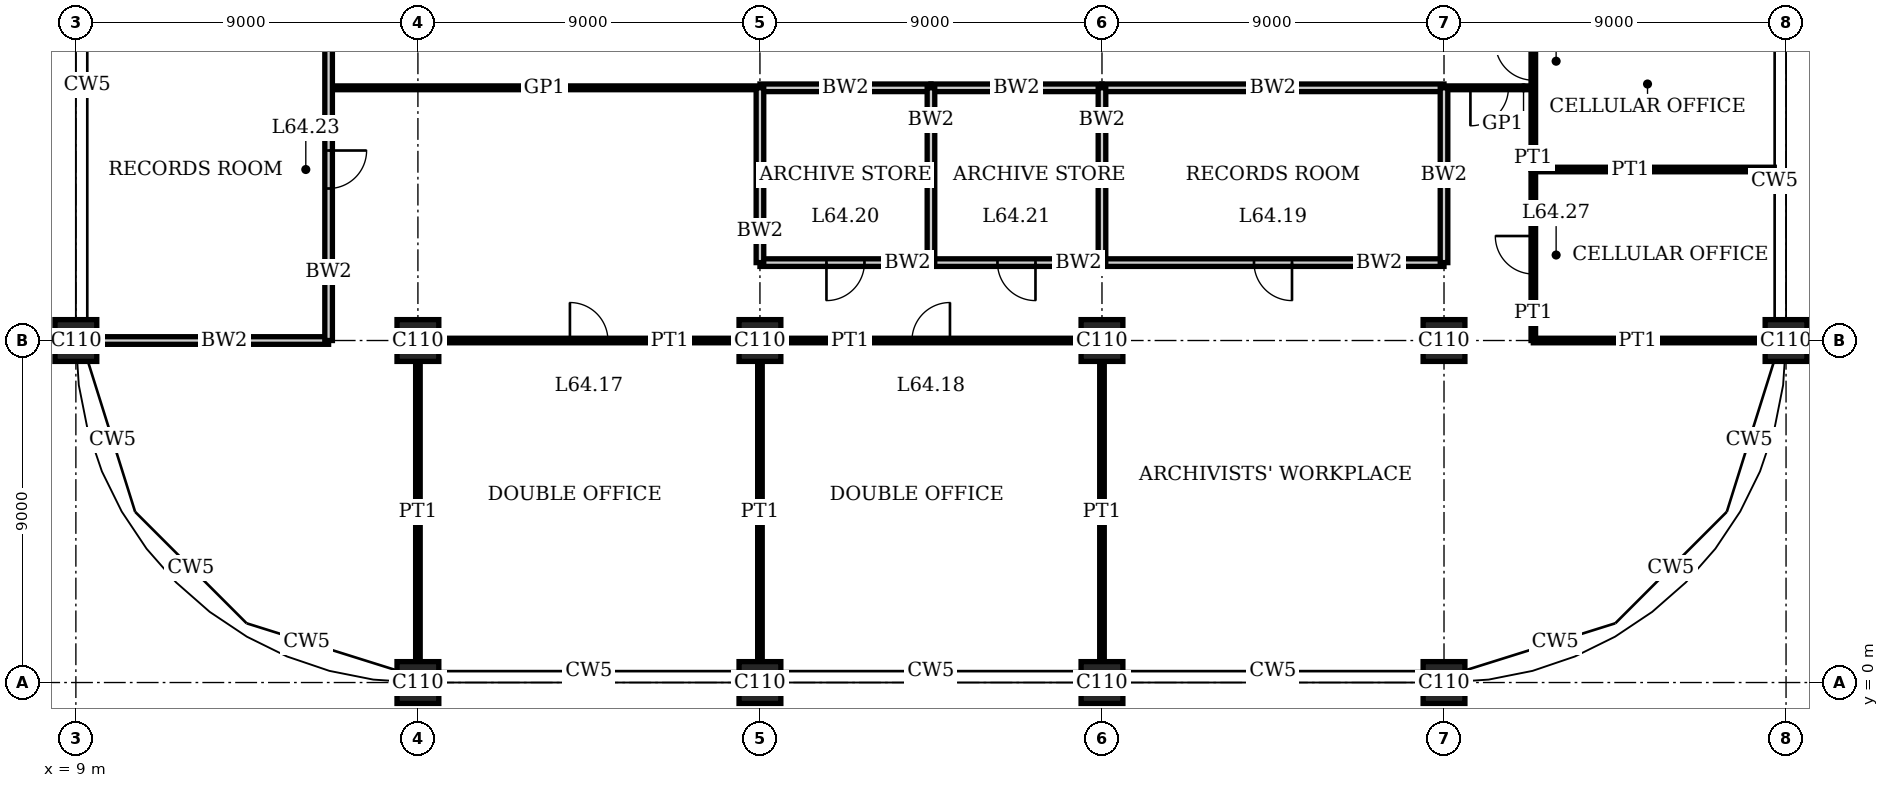
"""IFC4 building model, lengths in metres.
Left out: names, types, materials, properties, quantities, classifications, styles, units other than length and angle.
Written with IfcOpenShell. Run it as: python <this file> out.ifc"""

import sys

from ifc_helpers import new_model, si_unit, direction, frame, frame_2d, origin, origin_2d, place, context, subcontext, project, spatial, rectangle, extrude, element, fill, save


model = new_model("IFC4")
c1 = context("Model", 3, precision=1e-05, world=origin(), true_north=direction((0.0, 1.0)))
c2 = subcontext(c1, "Body", "Model", "MODEL_VIEW")
j1 = project(units=[si_unit("LENGTHUNIT", "METRE"), si_unit("PLANEANGLEUNIT", "RADIAN")], contexts=[c1])
p1 = place(None, origin())
s1 = spatial("IfcSite", under=j1, at=p1, CompositionType="ELEMENT")
p2 = place(p1, origin())
s2 = spatial("IfcBuilding", under=s1, at=p2, CompositionType="ELEMENT")
p3 = place(p2, frame((0.0, 0.0, 263.4)))
s3 = spatial("IfcBuildingStorey", under=s2, at=p3, CompositionType="ELEMENT", Elevation=263.4)
for number, where, z_axis, x_axis in (
    (1, (9.0, 9.0, 0.0), (0.0, 0.0, 1.0), (1.0, 0.0, 0.0)),
    (2, (18.0, 0.0, 0.0), (0.0, 0.0, 1.0), (1.0, 0.0, 0.0)),
    (3, (18.0, 9.0, 0.0), (0.0, 0.0, 1.0), (1.0, 0.0, 0.0)),
    (4, (27.0, 0.0, 0.0), (0.0, 0.0, 1.0), (1.0, 0.0, 0.0)),
    (5, (27.0, 9.0, 0.0), (0.0, 0.0, 1.0), (1.0, 0.0, 0.0)),
    (6, (36.0, 0.0, 0.0), (0.0, 0.0, 1.0), (1.0, 0.0, 0.0)),
    (7, (36.0, 9.0, 0.0), (0.0, 0.0, 1.0), (1.0, 0.0, 0.0)),
    (8, (45.0, 0.0, 0.0), (0.0, 0.0, 1.0), (1.0, 0.0, 0.0)),
    (9, (45.0, 9.0, 0.0), (0.0, 0.0, 1.0), (1.0, 0.0, 0.0)),
    (10, (54.0, 9.0, 0.0), (0.0, 0.0, 1.0), (1.0, 0.0, 0.0)),
):
    element("IfcColumn", number, at=place(p3, frame(where, z_axis=z_axis, x_axis=x_axis)), inside=s3, PredefinedType="COLUMN", context=c2, shape_type="SweptSolid", body=[
        extrude(rectangle(XDim=1.1, YDim=1.1, at=origin_2d()), origin(), (0.0, 0.0, 1.0), 4.0),
    ])
p4 = place(p3, frame((9.55, 9.0, 0.0), z_axis=(0.0, 0.0, 1.0), x_axis=(1.0, 0.0, 0.0)))
e11 = element("IfcWall", 11, at=p4, inside=s3, PredefinedType="SOLIDWALL", context=c2, shape_type="SweptSolid", body=[
    extrude(rectangle(XDim=6.1, YDim=0.2, at=frame_2d((3.05, 0.0))), origin(), (0.0, 0.0, 1.0), 3.05),
])
p5 = place(p3, frame((18.55, 9.0, 0.0), z_axis=(0.0, 0.0, 1.0), x_axis=(1.0, 0.0, 0.0)))
e12 = element("IfcWall", 12, at=p5, inside=s3, PredefinedType="PARTITIONING", context=c2, shape_type="SweptSolid", body=[
    extrude(rectangle(XDim=7.9, YDim=0.12, at=frame_2d((3.95, 0.0))), origin(), (0.0, 0.0, 1.0), 3.05),
])
p6 = place(p5, frame((3.45, 0.0, 0.0)))
e13 = element("IfcOpeningElement", 13, at=p6, cuts=e12, PredefinedType="OPENING", context=c2, shape_type="SweptSolid", body=[
    extrude(rectangle(XDim=1.0, YDim=2.4, at=frame_2d((0.5, 1.2))), frame((0.0, 0.07, 0.0), z_axis=(0.0, -1.0, 0.0), x_axis=(1.0, 0.0, 0.0)), (0.0, 0.0, 1.0), 0.14),
])
p7 = place(p3, frame((27.55, 9.0, 0.0), z_axis=(0.0, 0.0, 1.0), x_axis=(1.0, 0.0, 0.0)))
e14 = element("IfcWall", 14, at=p7, inside=s3, PredefinedType="PARTITIONING", context=c2, shape_type="SweptSolid", body=[
    extrude(rectangle(XDim=7.9, YDim=0.12, at=frame_2d((3.95, 0.0))), origin(), (0.0, 0.0, 1.0), 3.05),
])
p8 = place(p7, frame((3.45, 0.0, 0.0)))
e15 = element("IfcOpeningElement", 15, at=p8, cuts=e14, PredefinedType="OPENING", context=c2, shape_type="SweptSolid", body=[
    extrude(rectangle(XDim=1.0, YDim=2.4, at=frame_2d((0.5, 1.2))), frame((0.0, 0.07, 0.0), z_axis=(0.0, -1.0, 0.0), x_axis=(1.0, 0.0, 0.0)), (0.0, 0.0, 1.0), 0.14),
])
p9 = place(p3, frame((47.35, 9.0, 0.0), z_axis=(0.0, 0.0, 1.0), x_axis=(1.0, 0.0, 0.0)))
e16 = element("IfcWall", 16, at=p9, inside=s3, PredefinedType="PARTITIONING", context=c2, shape_type="SweptSolid", body=[
    extrude(rectangle(XDim=6.1, YDim=0.12, at=frame_2d((3.05, 0.0))), origin(), (0.0, 0.0, 1.0), 3.05),
])
p10 = place(p3, frame((36.0, 11.05, 0.0), z_axis=(0.0, 0.0, 1.0), x_axis=(1.0, 0.0, 0.0)))
e17 = element("IfcWall", 17, at=p10, inside=s3, PredefinedType="SOLIDWALL", context=c2, shape_type="SweptSolid", body=[
    extrude(rectangle(XDim=9.0, YDim=0.2, at=frame_2d((4.5, 0.0))), origin(), (0.0, 0.0, 1.0), 3.75),
])
p11 = place(p10, frame((4.0, 0.0, 0.0)))
e18 = element("IfcOpeningElement", 18, at=p11, cuts=e17, PredefinedType="OPENING", context=c2, shape_type="SweptSolid", body=[
    extrude(rectangle(XDim=1.0, YDim=2.4, at=frame_2d((0.5, 1.2))), frame((0.0, 0.11, 0.0), z_axis=(0.0, -1.0, 0.0), x_axis=(1.0, 0.0, 0.0)), (0.0, 0.0, 1.0), 0.22),
])
p12 = place(p3, frame((27.0, 11.05, 0.0), z_axis=(0.0, 0.0, 1.0), x_axis=(1.0, 0.0, 0.0)))
e19 = element("IfcWall", 19, at=p12, inside=s3, PredefinedType="SOLIDWALL", context=c2, shape_type="SweptSolid", body=[
    extrude(rectangle(XDim=4.5, YDim=0.2, at=frame_2d((2.25, 0.0))), origin(), (0.0, 0.0, 1.0), 3.75),
])
p13 = place(p12, frame((1.75, 0.0, 0.0)))
e20 = element("IfcOpeningElement", 20, at=p13, cuts=e19, PredefinedType="OPENING", context=c2, shape_type="SweptSolid", body=[
    extrude(rectangle(XDim=1.0, YDim=2.4, at=frame_2d((0.5, 1.2))), frame((0.0, 0.11, 0.0), z_axis=(0.0, -1.0, 0.0), x_axis=(1.0, 0.0, 0.0)), (0.0, 0.0, 1.0), 0.22),
])
p14 = place(p3, frame((31.5, 11.05, 0.0), z_axis=(0.0, 0.0, 1.0), x_axis=(1.0, 0.0, 0.0)))
e21 = element("IfcWall", 21, at=p14, inside=s3, PredefinedType="SOLIDWALL", context=c2, shape_type="SweptSolid", body=[
    extrude(rectangle(XDim=4.5, YDim=0.2, at=frame_2d((2.25, 0.0))), origin(), (0.0, 0.0, 1.0), 3.75),
])
p15 = place(p14, frame((1.75, 0.0, 0.0)))
e22 = element("IfcOpeningElement", 22, at=p15, cuts=e21, PredefinedType="OPENING", context=c2, shape_type="SweptSolid", body=[
    extrude(rectangle(XDim=1.0, YDim=2.4, at=frame_2d((0.5, 1.2))), frame((0.0, 0.11, 0.0), z_axis=(0.0, -1.0, 0.0), x_axis=(1.0, 0.0, 0.0)), (0.0, 0.0, 1.0), 0.22),
])
p16 = place(p3, frame((47.35, 13.5, 0.0), z_axis=(0.0, 0.0, 1.0), x_axis=(1.0, 0.0, 0.0)))
e23 = element("IfcWall", 23, at=p16, inside=s3, PredefinedType="PARTITIONING", context=c2, shape_type="SweptSolid", body=[
    extrude(rectangle(XDim=6.34, YDim=0.12, at=frame_2d((3.17, 0.0))), origin(), (0.0, 0.0, 1.0), 3.1),
])
p17 = place(p3, frame((36.0, 15.65, 0.0), z_axis=(0.0, 0.0, 1.0), x_axis=(1.0, 0.0, 0.0)))
e24 = element("IfcWall", 24, at=p17, inside=s3, PredefinedType="SOLIDWALL", context=c2, shape_type="SweptSolid", body=[
    extrude(rectangle(XDim=9.0, YDim=0.2, at=frame_2d((4.5, 0.0))), origin(), (0.0, 0.0, 1.0), 3.75),
])
for number, where, z_axis, x_axis in (
    (25, (27.0, 15.65, 0.0), (0.0, 0.0, 1.0), (1.0, 0.0, 0.0)),
    (26, (31.5, 15.65, 0.0), (0.0, 0.0, 1.0), (1.0, 0.0, 0.0)),
):
    element("IfcWall", number, at=place(p3, frame(where, z_axis=z_axis, x_axis=x_axis)), inside=s3, PredefinedType="SOLIDWALL", context=c2, shape_type="SweptSolid", body=[
        extrude(rectangle(XDim=4.5, YDim=0.2, at=frame_2d((2.25, 0.0))), origin(), (0.0, 0.0, 1.0), 3.75),
    ])
p18 = place(p3, frame((45.05, 15.65, 0.0), z_axis=(0.0, 0.0, 1.0), x_axis=(1.0, 0.0, 0.0)))
e27 = element("IfcWall", 27, at=p18, inside=s3, PredefinedType="PARTITIONING", context=c2, shape_type="SweptSolid", body=[
    extrude(rectangle(XDim=2.29, YDim=0.1, at=frame_2d((1.145, 0.0))), origin(), (0.0, 0.0, 1.0), 3.75),
])
p19 = place(p18, frame((0.645, 0.0, 0.0)))
e28 = element("IfcOpeningElement", 28, at=p19, cuts=e27, PredefinedType="OPENING", context=c2, shape_type="SweptSolid", body=[
    extrude(rectangle(XDim=1.0, YDim=2.4, at=frame_2d((0.5, 1.2))), frame((0.0, 0.06, 0.0), z_axis=(0.0, -1.0, 0.0), x_axis=(1.0, 0.0, 0.0)), (0.0, 0.0, 1.0), 0.12),
])
p20 = place(p3, frame((15.7, 15.65, 0.0), z_axis=(0.0, 0.0, 1.0), x_axis=(1.0, 0.0, 0.0)))
e29 = element("IfcWall", 29, at=p20, inside=s3, PredefinedType="PARTITIONING", context=c2, shape_type="SweptSolid", body=[
    extrude(rectangle(XDim=11.25, YDim=0.1, at=frame_2d((5.625, 0.0))), origin(), (0.0, 0.0, 1.0), 3.75),
])
p21 = place(p3, frame((15.65, 9.0, 0.0), z_axis=(0.0, 0.0, 1.0), x_axis=(0.0, 1.0, 0.0)))
e30 = element("IfcWall", 30, at=p21, inside=s3, PredefinedType="SOLIDWALL", context=c2, shape_type="SweptSolid", body=[
    extrude(rectangle(XDim=9.0, YDim=0.2, at=frame_2d((4.5, 0.0))), origin(), (0.0, 0.0, 1.0), 3.75),
])
p22 = place(p21, frame((4.0, 0.0, 0.0)))
e31 = element("IfcOpeningElement", 31, at=p22, cuts=e30, PredefinedType="OPENING", context=c2, shape_type="SweptSolid", body=[
    extrude(rectangle(XDim=1.0, YDim=2.4, at=frame_2d((0.5, 1.2))), frame((0.0, 0.11, 0.0), z_axis=(0.0, -1.0, 0.0), x_axis=(1.0, 0.0, 0.0)), (0.0, 0.0, 1.0), 0.22),
])
p23 = place(p3, frame((18.0, 0.55, 0.0), z_axis=(0.0, 0.0, 1.0), x_axis=(0.0, 1.0, 0.0)))
e32 = element("IfcWall", 32, at=p23, inside=s3, PredefinedType="PARTITIONING", context=c2, shape_type="SweptSolid", body=[
    extrude(rectangle(XDim=7.9, YDim=0.12, at=frame_2d((3.95, 0.0))), origin(), (0.0, 0.0, 1.0), 3.05),
])
p24 = place(p3, frame((27.0, 11.05, 0.0), z_axis=(0.0, 0.0, 1.0), x_axis=(0.0, 1.0, 0.0)))
e33 = element("IfcWall", 33, at=p24, inside=s3, PredefinedType="SOLIDWALL", context=c2, shape_type="SweptSolid", body=[
    extrude(rectangle(XDim=4.6, YDim=0.2, at=frame_2d((2.3, 0.0))), origin(), (0.0, 0.0, 1.0), 3.05),
])
p25 = place(p3, frame((27.0, 0.55, 0.0), z_axis=(0.0, 0.0, 1.0), x_axis=(0.0, 1.0, 0.0)))
e34 = element("IfcWall", 34, at=p25, inside=s3, PredefinedType="PARTITIONING", context=c2, shape_type="SweptSolid", body=[
    extrude(rectangle(XDim=7.9, YDim=0.12, at=frame_2d((3.95, 0.0))), origin(), (0.0, 0.0, 1.0), 3.05),
])
p26 = place(p3, frame((31.5, 11.05, 0.0), z_axis=(0.0, 0.0, 1.0), x_axis=(0.0, 1.0, 0.0)))
e35 = element("IfcWall", 35, at=p26, inside=s3, PredefinedType="SOLIDWALL", context=c2, shape_type="SweptSolid", body=[
    extrude(rectangle(XDim=4.6, YDim=0.2, at=frame_2d((2.3, 0.0))), origin(), (0.0, 0.0, 1.0), 3.75),
])
p27 = place(p3, frame((36.0, 11.05, 0.0), z_axis=(0.0, 0.0, 1.0), x_axis=(0.0, 1.0, 0.0)))
e36 = element("IfcWall", 36, at=p27, inside=s3, PredefinedType="SOLIDWALL", context=c2, shape_type="SweptSolid", body=[
    extrude(rectangle(XDim=4.6, YDim=0.2, at=frame_2d((2.3, 0.0))), origin(), (0.0, 0.0, 1.0), 3.05),
])
p28 = place(p3, frame((36.0, 0.55, 0.0), z_axis=(0.0, 0.0, 1.0), x_axis=(0.0, 1.0, 0.0)))
e37 = element("IfcWall", 37, at=p28, inside=s3, PredefinedType="PARTITIONING", context=c2, shape_type="SweptSolid", body=[
    extrude(rectangle(XDim=7.9, YDim=0.12, at=frame_2d((3.95, 0.0))), origin(), (0.0, 0.0, 1.0), 3.05),
])
p29 = place(p3, frame((45.0, 11.05, 0.0), z_axis=(0.0, 0.0, 1.0), x_axis=(0.0, 1.0, 0.0)))
e38 = element("IfcWall", 38, at=p29, inside=s3, PredefinedType="SOLIDWALL", context=c2, shape_type="SweptSolid", body=[
    extrude(rectangle(XDim=4.6, YDim=0.2, at=frame_2d((2.3, 0.0))), origin(), (0.0, 0.0, 1.0), 3.05),
])
p30 = place(p3, frame((47.35, 9.0, 0.0), z_axis=(0.0, 0.0, 1.0), x_axis=(0.0, 1.0, 0.0)))
e39 = element("IfcWall", 39, at=p30, inside=s3, PredefinedType="PARTITIONING", context=c2, shape_type="SweptSolid", body=[
    extrude(rectangle(XDim=4.5, YDim=0.12, at=frame_2d((2.25, 0.0))), origin(), (0.0, 0.0, 1.0), 3.75),
])
p31 = place(p30, frame((1.75, 0.0, 0.0)))
e40 = element("IfcOpeningElement", 40, at=p31, cuts=e39, PredefinedType="OPENING", context=c2, shape_type="SweptSolid", body=[
    extrude(rectangle(XDim=1.0, YDim=2.4, at=frame_2d((0.5, 1.2))), frame((0.0, 0.07, 0.0), z_axis=(0.0, -1.0, 0.0), x_axis=(1.0, 0.0, 0.0)), (0.0, 0.0, 1.0), 0.14),
])
p32 = place(p3, frame((47.35, 13.5, 0.0), z_axis=(0.0, 0.0, 1.0), x_axis=(0.0, 1.0, 0.0)))
e41 = element("IfcWall", 41, at=p32, inside=s3, PredefinedType="PARTITIONING", context=c2, shape_type="SweptSolid", body=[
    extrude(rectangle(XDim=4.5, YDim=0.12, at=frame_2d((2.25, 0.0))), origin(), (0.0, 0.0, 1.0), 3.75),
])
p33 = place(p32, frame((2.35, 0.0, 0.0)))
e42 = element("IfcOpeningElement", 42, at=p33, cuts=e41, PredefinedType="OPENING", context=c2, shape_type="SweptSolid", body=[
    extrude(rectangle(XDim=1.0, YDim=2.4, at=frame_2d((0.5, 1.2))), frame((0.0, 0.07, 0.0), z_axis=(0.0, -1.0, 0.0), x_axis=(1.0, 0.0, 0.0)), (0.0, 0.0, 1.0), 0.14),
])
p34 = place(p6, origin())
e43 = element("IfcDoor", 43, at=p34, inside=s3, OperationType="SINGLE_SWING_RIGHT", PredefinedType="DOOR", context=c2, shape_type="SweptSolid", body=[
    extrude(rectangle(XDim=1.0, YDim=2.4, at=frame_2d((0.5, 1.2))), frame((0.0, 0.025, 0.0), z_axis=(0.0, -1.0, 0.0), x_axis=(1.0, 0.0, 0.0)), (0.0, 0.0, 1.0), 0.05),
])
fill(e13, e43)
p35 = place(p8, origin())
e44 = element("IfcDoor", 44, at=p35, inside=s3, OperationType="SINGLE_SWING_LEFT", PredefinedType="DOOR", context=c2, shape_type="SweptSolid", body=[
    extrude(rectangle(XDim=1.0, YDim=2.4, at=frame_2d((0.5, 1.2))), frame((0.0, 0.025, 0.0), z_axis=(0.0, -1.0, 0.0), x_axis=(1.0, 0.0, 0.0)), (0.0, 0.0, 1.0), 0.05),
])
fill(e15, e44)
p36 = place(p11, origin())
e45 = element("IfcDoor", 45, at=p36, inside=s3, OperationType="SINGLE_SWING_RIGHT", PredefinedType="DOOR", context=c2, shape_type="SweptSolid", body=[
    extrude(rectangle(XDim=1.0, YDim=2.4, at=frame_2d((0.5, 1.2))), frame((0.0, 0.035, 0.0), z_axis=(0.0, -1.0, 0.0), x_axis=(1.0, 0.0, 0.0)), (0.0, 0.0, 1.0), 0.07),
])
fill(e18, e45)
p37 = place(p13, origin())
e46 = element("IfcDoor", 46, at=p37, inside=s3, OperationType="SINGLE_SWING_LEFT", PredefinedType="DOOR", context=c2, shape_type="SweptSolid", body=[
    extrude(rectangle(XDim=1.0, YDim=2.4, at=frame_2d((0.5, 1.2))), frame((0.0, 0.035, 0.0), z_axis=(0.0, -1.0, 0.0), x_axis=(1.0, 0.0, 0.0)), (0.0, 0.0, 1.0), 0.07),
])
fill(e20, e46)
p38 = place(p15, origin())
e47 = element("IfcDoor", 47, at=p38, inside=s3, OperationType="SINGLE_SWING_RIGHT", PredefinedType="DOOR", context=c2, shape_type="SweptSolid", body=[
    extrude(rectangle(XDim=1.0, YDim=2.4, at=frame_2d((0.5, 1.2))), frame((0.0, 0.035, 0.0), z_axis=(0.0, -1.0, 0.0), x_axis=(1.0, 0.0, 0.0)), (0.0, 0.0, 1.0), 0.07),
])
fill(e22, e47)
p39 = place(p19, origin())
e48 = element("IfcDoor", 48, at=p39, inside=s3, OperationType="SINGLE_SWING_LEFT", PredefinedType="DOOR", context=c2, shape_type="SweptSolid", body=[
    extrude(rectangle(XDim=1.0, YDim=2.4, at=frame_2d((0.5, 1.2))), frame((0.0, 0.02, 0.0), z_axis=(0.0, -1.0, 0.0), x_axis=(1.0, 0.0, 0.0)), (0.0, 0.0, 1.0), 0.04),
])
fill(e28, e48)
p40 = place(p22, origin())
e49 = element("IfcDoor", 49, at=p40, inside=s3, OperationType="SINGLE_SWING_RIGHT", PredefinedType="DOOR", context=c2, shape_type="SweptSolid", body=[
    extrude(rectangle(XDim=1.0, YDim=2.4, at=frame_2d((0.5, 1.2))), frame((0.0, 0.035, 0.0), z_axis=(0.0, -1.0, 0.0), x_axis=(1.0, 0.0, 0.0)), (0.0, 0.0, 1.0), 0.07),
])
fill(e31, e49)
p41 = place(p31, origin())
e50 = element("IfcDoor", 50, at=p41, inside=s3, OperationType="SINGLE_SWING_LEFT", PredefinedType="DOOR", context=c2, shape_type="SweptSolid", body=[
    extrude(rectangle(XDim=1.0, YDim=2.4, at=frame_2d((0.5, 1.2))), frame((0.0, 0.025, 0.0), z_axis=(0.0, -1.0, 0.0), x_axis=(1.0, 0.0, 0.0)), (0.0, 0.0, 1.0), 0.05),
])
fill(e40, e50)
p42 = place(p33, origin())
e51 = element("IfcDoor", 51, at=p42, inside=s3, OperationType="SINGLE_SWING_LEFT", PredefinedType="DOOR", context=c2, shape_type="SweptSolid", body=[
    extrude(rectangle(XDim=1.0, YDim=2.4, at=frame_2d((0.5, 1.2))), frame((0.0, 0.025, 0.0), z_axis=(0.0, -1.0, 0.0), x_axis=(1.0, 0.0, 0.0)), (0.0, 0.0, 1.0), 0.05),
])
fill(e42, e51)
save(model, sys.argv[1])
